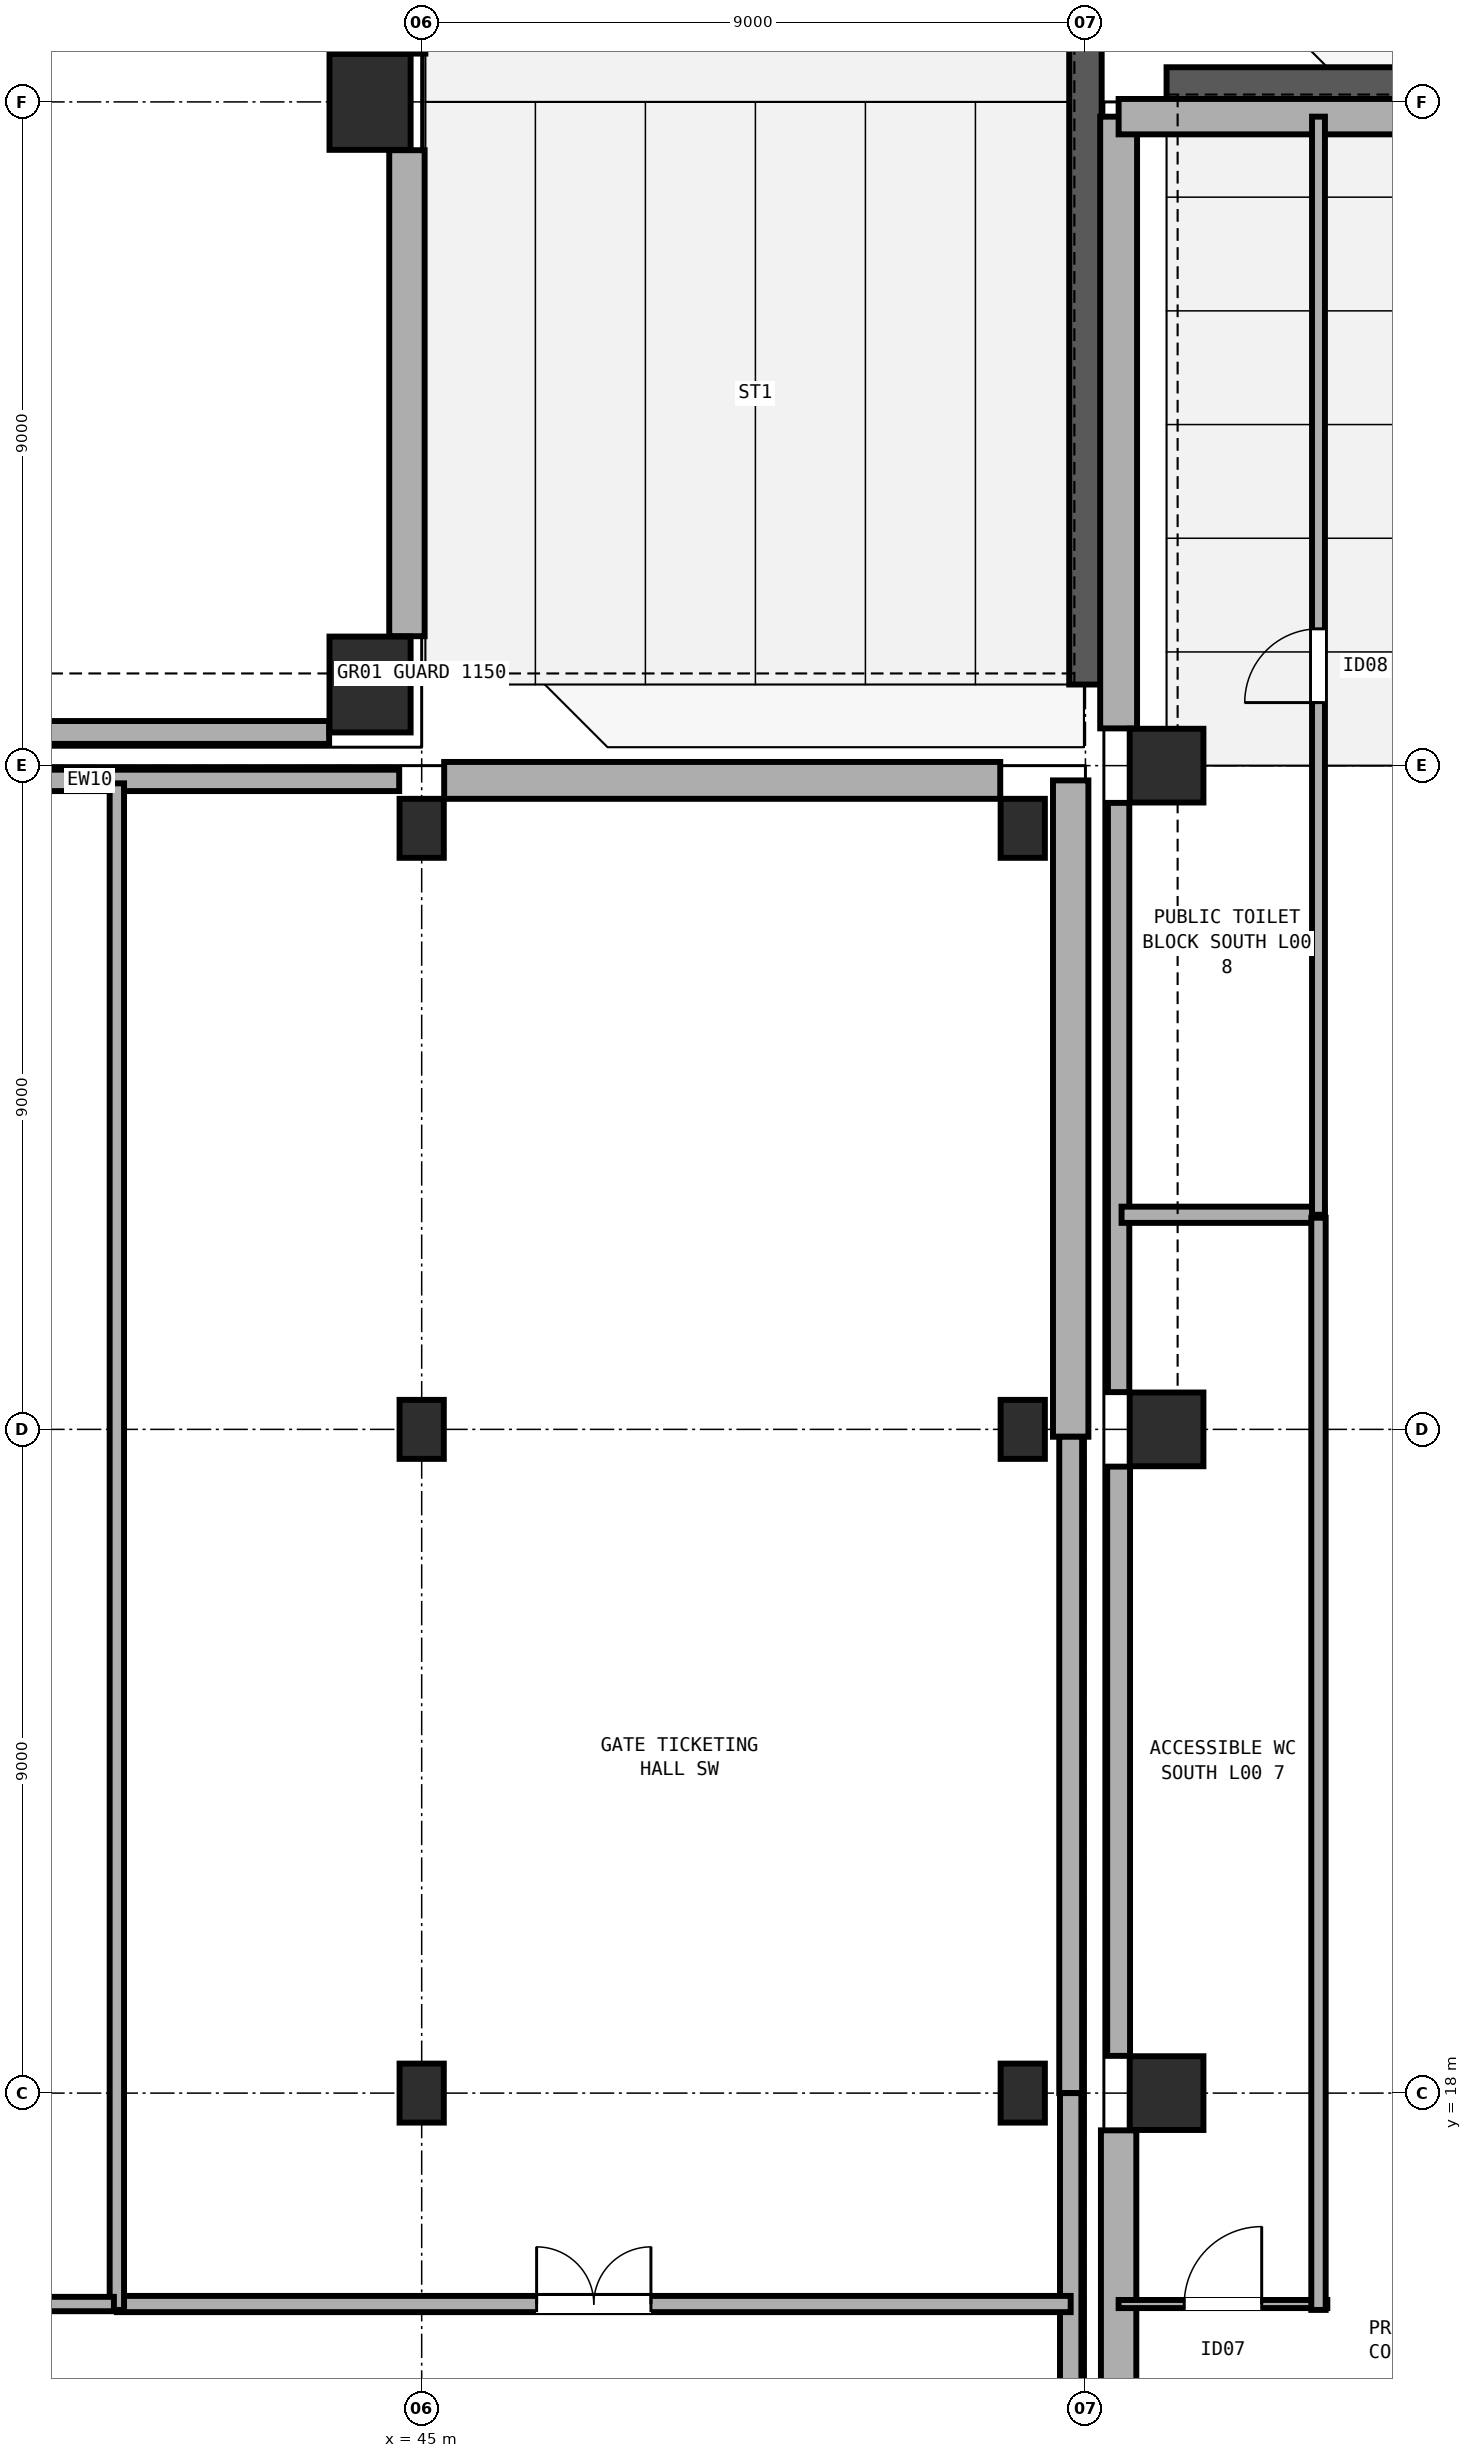
"""IFC4 building model, lengths in metres.
Left out: names, types, materials, properties, quantities, classifications, styles, units other than length and angle.
Written with IfcOpenShell. Run it as: python <this file> out.ifc"""

import sys

from ifc_helpers import new_model, si_unit, direction, frame, frame_2d, origin, origin_2d, place, context, subcontext, project, spatial, rectangle, extrude, element, fill, save


model = new_model("IFC4")
c1 = context("Model", 3, precision=1e-05, world=origin(), true_north=direction((0.0, 1.0)))
c2 = subcontext(c1, "Body", "Model", "MODEL_VIEW")
j1 = project(units=[si_unit("LENGTHUNIT", "METRE"), si_unit("PLANEANGLEUNIT", "RADIAN")], contexts=[c1])
p1 = place(None, origin())
s1 = spatial("IfcSite", under=j1, at=p1, CompositionType="ELEMENT")
p2 = place(p1, origin())
s2 = spatial("IfcBuilding", under=s1, at=p2, CompositionType="ELEMENT")
p3 = place(p2, origin())
s3 = spatial("IfcBuildingStorey", under=s2, at=p3, CompositionType="ELEMENT", Elevation=0.0)
for number, where, z_axis, x_axis in (
    (1, (44.3, 37.1, 0.0), (0.0, 0.0, 1.0), (1.0, 0.0, 0.0)),
    (2, (44.3, 45.0, 0.0), (0.0, 0.0, 1.0), (1.0, 0.0, 0.0)),
):
    element("IfcColumn", number, at=place(p3, frame(where, z_axis=z_axis, x_axis=x_axis)), inside=s3, PredefinedType="COLUMN", context=c2, shape_type="SweptSolid", body=[
        extrude(rectangle(XDim=1.1, YDim=1.3, at=origin_2d()), origin(), (0.0, 0.0, 1.0), 4.8),
    ])
for number, where, z_axis, x_axis in (
    (3, (55.1, 18.0, 0.0), (0.0, 0.0, 1.0), (1.0, 0.0, 0.0)),
    (4, (55.1, 27.0, 0.0), (0.0, 0.0, 1.0), (1.0, 0.0, 0.0)),
    (5, (55.1, 36.0, 0.0), (0.0, 0.0, 1.0), (1.0, 0.0, 0.0)),
):
    element("IfcColumn", number, at=place(p3, frame(where, z_axis=z_axis, x_axis=x_axis)), inside=s3, PredefinedType="COLUMN", context=c2, shape_type="SweptSolid", body=[
        extrude(rectangle(XDim=1.0, YDim=1.0, at=origin_2d()), origin(), (0.0, 0.0, 1.0), 4.8),
    ])
for number, where, z_axis, x_axis in (
    (6, (45.0, 18.0, 0.0), (0.0, 0.0, 1.0), (1.0, 0.0, 0.0)),
    (7, (45.0, 27.0, 0.0), (0.0, 0.0, 1.0), (1.0, 0.0, 0.0)),
    (8, (45.0, 35.15, 0.0), (0.0, 0.0, 1.0), (1.0, 0.0, 0.0)),
    (9, (53.15, 18.0, 0.0), (0.0, 0.0, 1.0), (1.0, 0.0, 0.0)),
    (10, (53.15, 27.0, 0.0), (0.0, 0.0, 1.0), (1.0, 0.0, 0.0)),
    (11, (53.15, 35.15, 0.0), (0.0, 0.0, 1.0), (1.0, 0.0, 0.0)),
):
    element("IfcColumn", number, at=place(p3, frame(where, z_axis=z_axis, x_axis=x_axis)), inside=s3, PredefinedType="COLUMN", context=c2, shape_type="SweptSolid", body=[
        extrude(rectangle(XDim=0.6, YDim=0.8, at=origin_2d()), origin(), (0.0, 0.0, 1.0), 4.8),
    ])
p4 = place(p3, frame((54.0, 37.1, 0.0), z_axis=(0.0, 0.0, 1.0), x_axis=(0.0, 1.0, 0.0)))
e12 = element("IfcWall", 12, at=p4, inside=s3, PredefinedType="SOLIDWALL", context=c2, shape_type="SweptSolid", body=[
    extrude(rectangle(XDim=87.8, YDim=0.44, at=frame_2d((43.9, 0.0))), origin(), (0.0, 0.0, 1.0), 0.9),
])
p5 = place(p3, frame((55.1, 45.25, 0.0), z_axis=(0.0, 0.0, 1.0), x_axis=(1.0, 0.0, 0.0)))
e13 = element("IfcWall", 13, at=p5, inside=s3, PredefinedType="SOLIDWALL", context=c2, shape_type="SweptSolid", body=[
    extrude(rectangle(XDim=105.8, YDim=0.44, at=frame_2d((52.9, 0.0))), origin(), (0.0, 0.0, 1.0), 0.9),
])
p6 = place(p3, frame((44.8, 51.545, 0.0), z_axis=(0.0, 0.0, 1.0), x_axis=(0.0, -1.0, 0.0)))
e14 = element("IfcWall", 14, at=p6, inside=s3, PredefinedType="SOLIDWALL", context=c2, shape_type="SweptSolid", body=[
    extrude(rectangle(XDim=5.89, YDim=0.5, at=frame_2d((2.945, 0.0))), origin(), (0.0, 0.0, 1.0), 3.28),
])
p7 = place(p3, frame((44.8, 44.345, 0.0), z_axis=(0.0, 0.0, 1.0), x_axis=(0.0, -1.0, 0.0)))
e15 = element("IfcWall", 15, at=p7, inside=s3, PredefinedType="SOLIDWALL", context=c2, shape_type="SweptSolid", body=[
    extrude(rectangle(XDim=6.59, YDim=0.48, at=frame_2d((3.295, 0.0))), origin(), (0.0, 0.0, 1.0), 3.28),
])
p8 = place(p3, frame((43.745, 36.45, 0.0), z_axis=(0.0, 0.0, 1.0), x_axis=(-1.0, 0.0, 0.0)))
e16 = element("IfcWall", 16, at=p8, inside=s3, PredefinedType="SOLIDWALL", context=c2, shape_type="SweptSolid", body=[
    extrude(rectangle(XDim=7.14, YDim=0.31, at=frame_2d((3.57, 0.0))), origin(), (0.0, 0.0, 1.0), 3.28),
])
p9 = place(p3, frame((54.45, 9.505, 0.0), z_axis=(0.0, 0.0, 1.0), x_axis=(0.0, 1.0, 0.0)))
e17 = element("IfcWall", 17, at=p9, inside=s3, PredefinedType="SOLIDWALL", context=c2, shape_type="SweptSolid", body=[
    extrude(rectangle(XDim=7.99, YDim=0.48, at=frame_2d((3.995, 0.0))), origin(), (0.0, 0.0, 1.0), 3.28),
])
p10 = place(p3, frame((54.45, 18.505, 0.0), z_axis=(0.0, 0.0, 1.0), x_axis=(0.0, 1.0, 0.0)))
e18 = element("IfcWall", 18, at=p10, inside=s3, PredefinedType="SOLIDWALL", context=c2, shape_type="SweptSolid", body=[
    extrude(rectangle(XDim=7.99, YDim=0.31, at=frame_2d((3.995, 0.0))), origin(), (0.0, 0.0, 1.0), 3.28),
])
p11 = place(p3, frame((54.45, 27.505, 0.0), z_axis=(0.0, 0.0, 1.0), x_axis=(0.0, 1.0, 0.0)))
e19 = element("IfcWall", 19, at=p11, inside=s3, PredefinedType="SOLIDWALL", context=c2, shape_type="SweptSolid", body=[
    extrude(rectangle(XDim=7.99, YDim=0.29, at=frame_2d((3.995, 0.0))), origin(), (0.0, 0.0, 1.0), 3.28),
])
p12 = place(p3, frame((54.45, 36.505, 0.0), z_axis=(0.0, 0.0, 1.0), x_axis=(0.0, 1.0, 0.0)))
e20 = element("IfcWall", 20, at=p12, inside=s3, PredefinedType="SOLIDWALL", context=c2, shape_type="SweptSolid", body=[
    extrude(rectangle(XDim=8.295, YDim=0.5, at=frame_2d((4.147, 0.0))), origin(), (0.0, 0.0, 1.0), 3.28),
])
p13 = place(p3, frame((54.45, 44.8, 0.0), z_axis=(0.0, 0.0, 1.0), x_axis=(1.0, 0.0, 0.0)))
e21 = element("IfcWall", 21, at=p13, inside=s3, PredefinedType="SOLIDWALL", context=c2, shape_type="SweptSolid", body=[
    extrude(rectangle(XDim=8.925, YDim=0.48, at=frame_2d((4.462, 0.0))), origin(), (0.0, 0.0, 1.0), 3.28),
])
p14 = place(p3, frame((36.305, 35.8, 0.0), z_axis=(0.0, 0.0, 1.0), x_axis=(1.0, 0.0, 0.0)))
e22 = element("IfcWall", 22, at=p14, inside=s3, PredefinedType="SOLIDWALL", context=c2, shape_type="SweptSolid", body=[
    extrude(rectangle(XDim=8.39, YDim=0.29, at=frame_2d((4.195, 0.0))), origin(), (0.0, 0.0, 1.0), 3.28),
])
p15 = place(p3, frame((45.305, 35.8, 0.0), z_axis=(0.0, 0.0, 1.0), x_axis=(1.0, 0.0, 0.0)))
e23 = element("IfcWall", 23, at=p15, inside=s3, PredefinedType="SOLIDWALL", context=c2, shape_type="SweptSolid", body=[
    extrude(rectangle(XDim=7.54, YDim=0.5, at=frame_2d((3.77, 0.0))), origin(), (0.0, 0.0, 1.0), 3.28),
])
p16 = place(p3, frame((53.8, 35.8, 0.0), z_axis=(0.0, 0.0, 1.0), x_axis=(0.0, -1.0, 0.0)))
e24 = element("IfcWall", 24, at=p16, inside=s3, PredefinedType="SOLIDWALL", context=c2, shape_type="SweptSolid", body=[
    extrude(rectangle(XDim=8.9, YDim=0.48, at=frame_2d((4.45, 0.0))), origin(), (0.0, 0.0, 1.0), 3.28),
])
p17 = place(p3, frame((53.8, 26.9, 0.0), z_axis=(0.0, 0.0, 1.0), x_axis=(0.0, -1.0, 0.0)))
e25 = element("IfcWall", 25, at=p17, inside=s3, PredefinedType="SOLIDWALL", context=c2, shape_type="SweptSolid", body=[
    extrude(rectangle(XDim=8.9, YDim=0.31, at=frame_2d((4.45, 0.0))), origin(), (0.0, 0.0, 1.0), 3.28),
])
p18 = place(p3, frame((53.8, 18.0, 0.0), z_axis=(0.0, 0.0, 1.0), x_axis=(0.0, -1.0, 0.0)))
e26 = element("IfcWall", 26, at=p18, inside=s3, PredefinedType="SOLIDWALL", context=c2, shape_type="SweptSolid", body=[
    extrude(rectangle(XDim=8.9, YDim=0.29, at=frame_2d((4.45, 0.0))), origin(), (0.0, 0.0, 1.0), 3.28),
])
p19 = place(p3, frame((54.45, 15.14, 0.0), z_axis=(0.0, 0.0, 1.0), x_axis=(1.0, 0.0, 0.0)))
e27 = element("IfcWall", 27, at=p19, inside=s3, PredefinedType="PARTITIONING", context=c2, shape_type="SweptSolid", body=[
    extrude(rectangle(XDim=2.83, YDim=0.11, at=frame_2d((1.415, 0.0))), origin(), (0.0, 0.0, 1.0), 3.28),
])
p20 = place(p19, frame((0.89, 0.0, 0.0)))
e28 = element("IfcOpeningElement", 28, at=p20, cuts=e27, PredefinedType="OPENING", context=c2, shape_type="SweptSolid", body=[
    extrude(rectangle(XDim=1.05, YDim=2.1, at=frame_2d((0.525, 1.05))), frame((0.0, 0.065, 0.0), z_axis=(0.0, -1.0, 0.0), x_axis=(1.0, 0.0, 0.0)), (0.0, 0.0, 1.0), 0.13),
])
p21 = place(p3, frame((54.49, 29.91, 0.0), z_axis=(0.0, 0.0, 1.0), x_axis=(1.0, 0.0, 0.0)))
e29 = element("IfcWall", 29, at=p21, inside=s3, PredefinedType="PARTITIONING", context=c2, shape_type="SweptSolid", body=[
    extrude(rectangle(XDim=2.75, YDim=0.22, at=frame_2d((1.375, 0.0))), origin(), (0.0, 0.0, 1.0), 3.28),
])
p22 = place(p3, frame((57.16, 29.87, 0.0), z_axis=(0.0, 0.0, 1.0), x_axis=(0.0, -1.0, 0.0)))
e30 = element("IfcWall", 30, at=p22, inside=s3, PredefinedType="PARTITIONING", context=c2, shape_type="SweptSolid", body=[
    extrude(rectangle(XDim=14.81, YDim=0.195, at=frame_2d((7.405, 0.0))), origin(), (0.0, 0.0, 1.0), 3.28),
])
p23 = place(p3, frame((57.16, 29.91, 0.0), z_axis=(0.0, 0.0, 1.0), x_axis=(0.0, 1.0, 0.0)))
e31 = element("IfcWall", 31, at=p23, inside=s3, PredefinedType="PARTITIONING", context=c2, shape_type="SweptSolid", body=[
    extrude(rectangle(XDim=14.89, YDim=0.175, at=frame_2d((7.445, 0.0))), origin(), (0.0, 0.0, 1.0), 3.28),
])
p24 = place(p23, frame((6.945, 0.0, 0.0)))
e32 = element("IfcOpeningElement", 32, at=p24, cuts=e31, PredefinedType="OPENING", context=c2, shape_type="SweptSolid", body=[
    extrude(rectangle(XDim=1.0, YDim=2.1, at=frame_2d((0.5, 1.05))), frame((0.0, 0.097, 0.0), z_axis=(0.0, -1.0, 0.0), x_axis=(1.0, 0.0, 0.0)), (0.0, 0.0, 1.0), 0.195),
])
p25 = place(p3, frame((40.867, 15.14, 0.0), z_axis=(0.0, 0.0, 1.0), x_axis=(1.0, 0.0, 0.0)))
e33 = element("IfcWall", 33, at=p25, inside=s3, PredefinedType="PARTITIONING", context=c2, shape_type="SweptSolid", body=[
    extrude(rectangle(XDim=12.933, YDim=0.22, at=frame_2d((6.467, 0.0))), origin(), (0.0, 0.0, 1.0), 3.28),
])
p26 = place(p25, frame((5.692, 0.0, 0.0)))
e34 = element("IfcOpeningElement", 34, at=p26, cuts=e33, PredefinedType="OPENING", context=c2, shape_type="SweptSolid", body=[
    extrude(rectangle(XDim=1.55, YDim=2.2, at=frame_2d((0.775, 1.1))), frame((0.0, 0.12, 0.0), z_axis=(0.0, -1.0, 0.0), x_axis=(1.0, 0.0, 0.0)), (0.0, 0.0, 1.0), 0.24),
])
p27 = place(p3, frame((40.867, 15.06, 0.0), z_axis=(0.0, 0.0, 1.0), x_axis=(0.0, 1.0, 0.0)))
e35 = element("IfcWall", 35, at=p27, inside=s3, PredefinedType="PARTITIONING", context=c2, shape_type="SweptSolid", body=[
    extrude(rectangle(XDim=20.7, YDim=0.195, at=frame_2d((10.35, 0.0))), origin(), (0.0, 0.0, 1.0), 3.28),
])
p28 = place(p3, frame((40.827, 15.14, 0.0), z_axis=(0.0, 0.0, 1.0), x_axis=(-1.0, 0.0, 0.0)))
e36 = element("IfcWall", 36, at=p28, inside=s3, PredefinedType="PARTITIONING", context=c2, shape_type="SweptSolid", body=[
    extrude(rectangle(XDim=8.167, YDim=0.195, at=frame_2d((4.083, 0.0))), origin(), (0.0, 0.0, 1.0), 3.28),
])
p29 = place(p20, origin())
e37 = element("IfcDoor", 37, at=p29, inside=s3, OperationType="SINGLE_SWING_RIGHT", PredefinedType="DOOR", context=c2, shape_type="SweptSolid", body=[
    extrude(rectangle(XDim=1.05, YDim=2.1, at=frame_2d((0.525, 1.05))), frame((0.0, 0.025, 0.0), z_axis=(0.0, -1.0, 0.0), x_axis=(1.0, 0.0, 0.0)), (0.0, 0.0, 1.0), 0.05),
])
fill(e28, e37)
p30 = place(p24, origin())
e38 = element("IfcDoor", 38, at=p30, inside=s3, OperationType="SINGLE_SWING_LEFT", PredefinedType="DOOR", context=c2, shape_type="SweptSolid", body=[
    extrude(rectangle(XDim=1.0, YDim=2.1, at=frame_2d((0.5, 1.05))), frame((0.0, 0.025, 0.0), z_axis=(0.0, -1.0, 0.0), x_axis=(1.0, 0.0, 0.0)), (0.0, 0.0, 1.0), 0.05),
])
fill(e32, e38)
p31 = place(p26, origin())
e39 = element("IfcDoor", 39, at=p31, inside=s3, OperationType="DOUBLE_DOOR_SINGLE_SWING", PredefinedType="DOOR", context=c2, shape_type="SweptSolid", body=[
    extrude(rectangle(XDim=1.55, YDim=2.2, at=frame_2d((0.775, 1.1))), frame((0.0, 0.025, 0.0), z_axis=(0.0, -1.0, 0.0), x_axis=(1.0, 0.0, 0.0)), (0.0, 0.0, 1.0), 0.05),
])
fill(e34, e39)
save(model, sys.argv[1])
